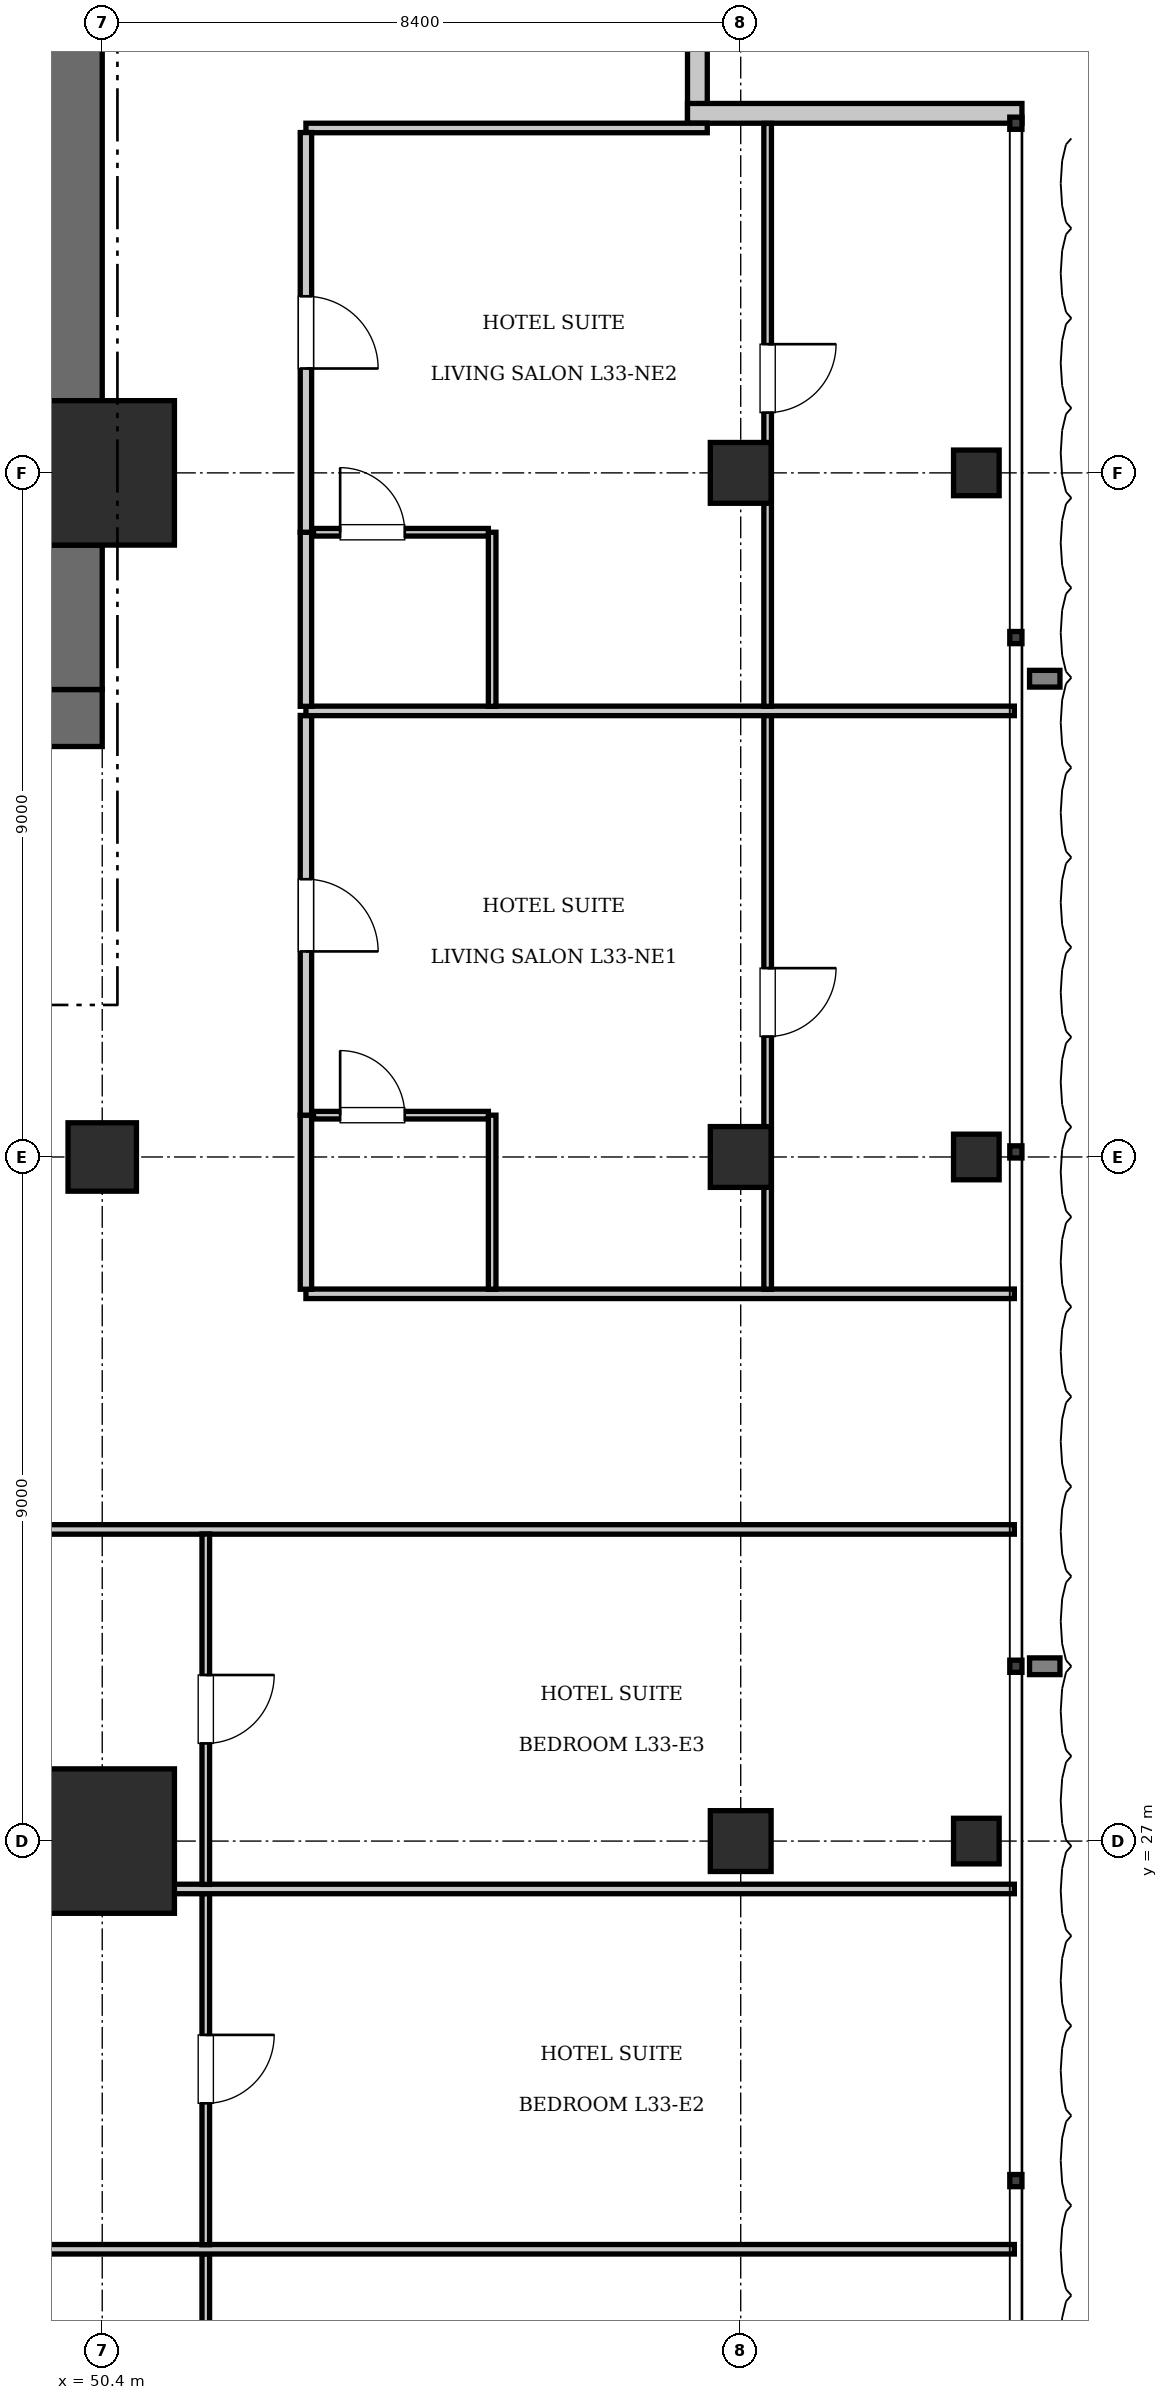
"""IFC4 building model, lengths in metres.
Left out: names, types, materials, properties, quantities, classifications, styles, units other than length and angle.
Written with IfcOpenShell. Run it as: python <this file> out.ifc"""

import sys

from ifc_helpers import new_model, si_unit, direction, frame, frame_2d, origin, origin_2d, place, context, subcontext, project, spatial, rectangle, i_section, extrude, element, fill, save


model = new_model("IFC4")
c1 = context("Model", 3, precision=1e-05, world=origin(), true_north=direction((0.0, 1.0)))
c2 = subcontext(c1, "Body", "Model", "MODEL_VIEW")
j1 = project(units=[si_unit("LENGTHUNIT", "METRE"), si_unit("PLANEANGLEUNIT", "RADIAN")], contexts=[c1])
p1 = place(None, origin())
s1 = spatial("IfcSite", under=j1, at=p1, CompositionType="ELEMENT")
p2 = place(p1, origin())
s2 = spatial("IfcBuilding", under=s1, at=p2, CompositionType="ELEMENT")
p3 = place(p2, frame((0.0, 0.0, 138.95)))
s3 = spatial("IfcBuildingStorey", under=s2, at=p3, CompositionType="ELEMENT", Elevation=138.95)
for number, where, z_axis, x_axis in (
    (1, (50.4, 27.0, 0.0), (0.0, 0.0, 1.0), (1.0, 0.0, 0.0)),
    (2, (50.4, 45.0, 0.0), (0.0, 0.0, 1.0), (1.0, 0.0, 0.0)),
):
    element("IfcColumn", number, at=place(p3, frame(where, z_axis=z_axis, x_axis=x_axis)), inside=s3, PredefinedType="COLUMN", context=c2, shape_type="SweptSolid", body=[
        extrude(rectangle(XDim=1.9, YDim=1.9, at=origin_2d()), origin(), (0.0, 0.0, 1.0), 3.85),
    ])
p4 = place(p3, frame((43.6, 41.775, 0.0), z_axis=(0.0, 0.0, 1.0), x_axis=(1.0, 0.0, 0.0)))
e3 = element("IfcWall", 3, at=p4, inside=s3, PredefinedType="SHEAR", context=c2, shape_type="SweptSolid", body=[
    extrude(rectangle(XDim=6.8, YDim=0.75, at=frame_2d((3.4, 0.0))), origin(), (0.0, 0.0, 1.0), 3.85),
])
p5 = place(p4, frame((3.9, 0.0, 0.0)))
e4 = element("IfcOpeningElement", 4, at=p5, cuts=e3, PredefinedType="OPENING", context=c2, shape_type="SweptSolid", body=[
    extrude(rectangle(XDim=1.15, YDim=2.15, at=frame_2d((0.575, 1.075))), frame((0.0, 0.385, 0.0), z_axis=(0.0, -1.0, 0.0), x_axis=(1.0, 0.0, 0.0)), (0.0, 0.0, 1.0), 0.77),
])
p6 = place(p4, frame((0.55, 0.0, 0.0)))
e5 = element("IfcOpeningElement", 5, at=p6, cuts=e3, PredefinedType="OPENING", context=c2, shape_type="SweptSolid", body=[
    extrude(rectangle(XDim=1.1, YDim=2.2, at=frame_2d((0.55, 1.1))), frame((0.0, 0.385, 0.0), z_axis=(0.0, -1.0, 0.0), x_axis=(1.0, 0.0, 0.0)), (0.0, 0.0, 1.0), 0.77),
])
p7 = place(p3, frame((50.025, 42.15, 0.0), z_axis=(0.0, 0.0, 1.0), x_axis=(0.0, 1.0, 0.0)))
e6 = element("IfcWall", 6, at=p7, inside=s3, PredefinedType="SHEAR", context=c2, shape_type="SweptSolid", body=[
    extrude(rectangle(XDim=1.9, YDim=0.75, at=frame_2d((0.95, 0.0))), origin(), (0.0, 0.0, 1.0), 3.85),
])
p8 = place(p3, frame((50.025, 45.95, 0.0), z_axis=(0.0, 0.0, 1.0), x_axis=(0.0, 1.0, 0.0)))
e7 = element("IfcWall", 7, at=p8, inside=s3, PredefinedType="SHEAR", context=c2, shape_type="SweptSolid", body=[
    extrude(rectangle(XDim=7.3, YDim=0.75, at=frame_2d((3.65, 0.0))), origin(), (0.0, 0.0, 1.0), 3.85),
])
p9 = place(p3, frame((50.4, 36.0, 0.0), z_axis=(0.0, 0.0, 1.0), x_axis=(1.0, 0.0, 0.0)))
e8 = element("IfcColumn", 8, at=p9, inside=s3, PredefinedType="COLUMN", context=c2, shape_type="SweptSolid", body=[
    extrude(rectangle(XDim=0.9, YDim=0.9, at=origin_2d()), origin(), (0.0, 0.0, 1.0), 3.85),
])
for number, where, z_axis, x_axis in (
    (9, (58.8, 27.0, 0.0), (0.0, 0.0, 1.0), (1.0, 0.0, 0.0)),
    (10, (58.8, 36.0, 0.0), (0.0, 0.0, 1.0), (1.0, 0.0, 0.0)),
    (11, (58.8, 45.0, 0.0), (0.0, 0.0, 1.0), (1.0, 0.0, 0.0)),
):
    element("IfcColumn", number, at=place(p3, frame(where, z_axis=z_axis, x_axis=x_axis)), inside=s3, PredefinedType="COLUMN", context=c2, shape_type="SweptSolid", body=[
        extrude(rectangle(XDim=0.8, YDim=0.8, at=origin_2d()), origin(), (0.0, 0.0, 1.0), 3.85),
    ])
for number, where, z_axis, x_axis in (
    (12, (61.9, 27.0, 0.0), (0.0, 0.0, 1.0), (1.0, 0.0, 0.0)),
    (13, (61.9, 36.0, 0.0), (0.0, 0.0, 1.0), (1.0, 0.0, 0.0)),
    (14, (61.9, 45.0, 0.0), (0.0, 0.0, 1.0), (1.0, 0.0, 0.0)),
):
    element("IfcColumn", number, at=place(p3, frame(where, z_axis=z_axis, x_axis=x_axis)), inside=s3, PredefinedType="COLUMN", context=c2, shape_type="SweptSolid", body=[
        extrude(i_section(OverallWidth=0.6, OverallDepth=0.6, WebThickness=0.025, FlangeThickness=0.038, at=origin_2d()), origin(), (0.0, 0.0, 1.0), 3.85),
    ])
for number, where, z_axis, x_axis in (
    (15, (58.23, 54.0, 0.0), (0.0, 0.0, 1.0), (0.0, -1.0, 0.0)),
    (16, (58.1, 49.73, 0.0), (0.0, 0.0, 1.0), (1.0, 0.0, 0.0)),
):
    element("IfcWall", number, at=place(p3, frame(where, z_axis=z_axis, x_axis=x_axis)), inside=s3, PredefinedType="SOLIDWALL", context=c2, shape_type="SweptSolid", body=[
        extrude(rectangle(XDim=4.4, YDim=0.26, at=frame_2d((2.2, 0.0))), origin(), (0.0, 0.0, 1.0), 3.61),
    ])
p10 = place(p3, frame((37.68, 31.1, 0.0), z_axis=(0.0, 0.0, 1.0), x_axis=(1.0, 0.0, 0.0)))
e17 = element("IfcWall", 17, at=p10, inside=s3, PredefinedType="PARTITIONING", context=c2, shape_type="SweptSolid", body=[
    extrude(rectangle(XDim=24.72, YDim=0.125, at=frame_2d((12.36, 0.0))), origin(), (0.0, 0.0, 1.0), 3.61),
])
p11 = place(p3, frame((51.762, 16.96, 0.0), z_axis=(0.0, 0.0, 1.0), x_axis=(0.0, 1.0, 0.0)))
e18 = element("IfcWall", 18, at=p11, inside=s3, PredefinedType="PARTITIONING", context=c2, shape_type="SweptSolid", body=[
    extrude(rectangle(XDim=4.61, YDim=0.1, at=frame_2d((2.305, 0.0))), origin(), (0.0, 0.0, 1.0), 3.61),
])
p12 = place(p11, frame((1.855, 0.0, 0.0)))
e19 = element("IfcOpeningElement", 19, at=p12, cuts=e18, PredefinedType="OPENING", context=c2, shape_type="SweptSolid", body=[
    extrude(rectangle(XDim=0.9, YDim=2.1, at=frame_2d((0.45, 1.05))), frame((0.0, 0.06, 0.0), z_axis=(0.0, -1.0, 0.0), x_axis=(1.0, 0.0, 0.0)), (0.0, 0.0, 1.0), 0.12),
])
p13 = place(p3, frame((37.68, 21.63, 0.0), z_axis=(0.0, 0.0, 1.0), x_axis=(1.0, 0.0, 0.0)))
e20 = element("IfcWall", 20, at=p13, inside=s3, PredefinedType="PARTITIONING", context=c2, shape_type="SweptSolid", body=[
    extrude(rectangle(XDim=24.72, YDim=0.125, at=frame_2d((12.36, 0.0))), origin(), (0.0, 0.0, 1.0), 3.61),
])
p14 = place(p3, frame((51.762, 21.69, 0.0), z_axis=(0.0, 0.0, 1.0), x_axis=(0.0, 1.0, 0.0)))
e21 = element("IfcWall", 21, at=p14, inside=s3, PredefinedType="PARTITIONING", context=c2, shape_type="SweptSolid", body=[
    extrude(rectangle(XDim=4.62, YDim=0.1, at=frame_2d((2.31, 0.0))), origin(), (0.0, 0.0, 1.0), 3.61),
])
p15 = place(p14, frame((1.86, 0.0, 0.0)))
e22 = element("IfcOpeningElement", 22, at=p15, cuts=e21, PredefinedType="OPENING", context=c2, shape_type="SweptSolid", body=[
    extrude(rectangle(XDim=0.9, YDim=2.1, at=frame_2d((0.45, 1.05))), frame((0.0, 0.06, 0.0), z_axis=(0.0, -1.0, 0.0), x_axis=(1.0, 0.0, 0.0)), (0.0, 0.0, 1.0), 0.12),
])
p16 = place(p3, frame((37.68, 26.37, 0.0), z_axis=(0.0, 0.0, 1.0), x_axis=(1.0, 0.0, 0.0)))
e23 = element("IfcWall", 23, at=p16, inside=s3, PredefinedType="PARTITIONING", context=c2, shape_type="SweptSolid", body=[
    extrude(rectangle(XDim=24.72, YDim=0.125, at=frame_2d((12.36, 0.0))), origin(), (0.0, 0.0, 1.0), 3.61),
])
p17 = place(p3, frame((51.762, 26.43, 0.0), z_axis=(0.0, 0.0, 1.0), x_axis=(0.0, 1.0, 0.0)))
e24 = element("IfcWall", 24, at=p17, inside=s3, PredefinedType="PARTITIONING", context=c2, shape_type="SweptSolid", body=[
    extrude(rectangle(XDim=4.61, YDim=0.1, at=frame_2d((2.305, 0.0))), origin(), (0.0, 0.0, 1.0), 3.61),
])
p18 = place(p17, frame((1.855, 0.0, 0.0)))
e25 = element("IfcOpeningElement", 25, at=p18, cuts=e24, PredefinedType="OPENING", context=c2, shape_type="SweptSolid", body=[
    extrude(rectangle(XDim=0.9, YDim=2.1, at=frame_2d((0.45, 1.05))), frame((0.0, 0.06, 0.0), z_axis=(0.0, -1.0, 0.0), x_axis=(1.0, 0.0, 0.0)), (0.0, 0.0, 1.0), 0.12),
])
p19 = place(p3, frame((53.08, 34.2, 0.0), z_axis=(0.0, 0.0, 1.0), x_axis=(1.0, 0.0, 0.0)))
e26 = element("IfcWall", 26, at=p19, inside=s3, PredefinedType="PARTITIONING", context=c2, shape_type="SweptSolid", body=[
    extrude(rectangle(XDim=9.32, YDim=0.125, at=frame_2d((4.66, 0.0))), origin(), (0.0, 0.0, 1.0), 3.61),
])
p20 = place(p3, frame((53.08, 49.538, 0.0), z_axis=(0.0, 0.0, 1.0), x_axis=(1.0, 0.0, 0.0)))
e27 = element("IfcWall", 27, at=p20, inside=s3, PredefinedType="PARTITIONING", context=c2, shape_type="SweptSolid", body=[
    extrude(rectangle(XDim=5.28, YDim=0.125, at=frame_2d((2.64, 0.0))), origin(), (0.0, 0.0, 1.0), 3.61),
])
p21 = place(p3, frame((53.08, 34.26, 0.0), z_axis=(0.0, 0.0, 1.0), x_axis=(0.0, 1.0, 0.0)))
e28 = element("IfcWall", 28, at=p21, inside=s3, PredefinedType="PARTITIONING", context=c2, shape_type="SweptSolid", body=[
    extrude(rectangle(XDim=2.29, YDim=0.15, at=frame_2d((1.145, 0.0))), origin(), (0.0, 0.0, 1.0), 3.61),
])
p22 = place(p3, frame((53.08, 36.55, 0.0), z_axis=(0.0, 0.0, 1.0), x_axis=(0.0, 1.0, 0.0)))
e29 = element("IfcWall", 29, at=p22, inside=s3, PredefinedType="PARTITIONING", context=c2, shape_type="SweptSolid", body=[
    extrude(rectangle(XDim=5.259, YDim=0.15, at=frame_2d((2.629, 0.0))), origin(), (0.0, 0.0, 1.0), 3.61),
])
p23 = place(p22, frame((2.154, 0.0, 0.0)))
e30 = element("IfcOpeningElement", 30, at=p23, cuts=e29, PredefinedType="OPENING", context=c2, shape_type="SweptSolid", body=[
    extrude(rectangle(XDim=0.95, YDim=2.15, at=frame_2d((0.475, 1.075))), frame((0.0, 0.085, 0.0), z_axis=(0.0, -1.0, 0.0), x_axis=(1.0, 0.0, 0.0)), (0.0, 0.0, 1.0), 0.17),
])
p24 = place(p3, frame((55.53, 34.26, 0.0), z_axis=(0.0, 0.0, 1.0), x_axis=(0.0, 1.0, 0.0)))
e31 = element("IfcWall", 31, at=p24, inside=s3, PredefinedType="PARTITIONING", context=c2, shape_type="SweptSolid", body=[
    extrude(rectangle(XDim=2.29, YDim=0.1, at=frame_2d((1.145, 0.0))), origin(), (0.0, 0.0, 1.0), 3.61),
])
p25 = place(p3, frame((53.18, 36.55, 0.0), z_axis=(0.0, 0.0, 1.0), x_axis=(1.0, 0.0, 0.0)))
e32 = element("IfcWall", 32, at=p25, inside=s3, PredefinedType="PARTITIONING", context=c2, shape_type="SweptSolid", body=[
    extrude(rectangle(XDim=2.3, YDim=0.1, at=frame_2d((1.15, 0.0))), origin(), (0.0, 0.0, 1.0), 3.61),
])
p26 = place(p25, frame((0.35, 0.0, 0.0)))
e33 = element("IfcOpeningElement", 33, at=p26, cuts=e32, PredefinedType="OPENING", context=c2, shape_type="SweptSolid", body=[
    extrude(rectangle(XDim=0.85, YDim=2.1, at=frame_2d((0.425, 1.05))), frame((0.0, 0.06, 0.0), z_axis=(0.0, -1.0, 0.0), x_axis=(1.0, 0.0, 0.0)), (0.0, 0.0, 1.0), 0.12),
])
p27 = place(p3, frame((59.154, 34.26, 0.0), z_axis=(0.0, 0.0, 1.0), x_axis=(0.0, 1.0, 0.0)))
e34 = element("IfcWall", 34, at=p27, inside=s3, PredefinedType="PARTITIONING", context=c2, shape_type="SweptSolid", body=[
    extrude(rectangle(XDim=7.549, YDim=0.1, at=frame_2d((3.774, 0.0))), origin(), (0.0, 0.0, 1.0), 3.61),
])
p28 = place(p27, frame((3.324, 0.0, 0.0)))
e35 = element("IfcOpeningElement", 35, at=p28, cuts=e34, PredefinedType="OPENING", context=c2, shape_type="SweptSolid", body=[
    extrude(rectangle(XDim=0.9, YDim=2.1, at=frame_2d((0.45, 1.05))), frame((0.0, 0.06, 0.0), z_axis=(0.0, -1.0, 0.0), x_axis=(1.0, 0.0, 0.0)), (0.0, 0.0, 1.0), 0.12),
])
p29 = place(p3, frame((53.08, 41.869, 0.0), z_axis=(0.0, 0.0, 1.0), x_axis=(1.0, 0.0, 0.0)))
e36 = element("IfcWall", 36, at=p29, inside=s3, PredefinedType="PARTITIONING", context=c2, shape_type="SweptSolid", body=[
    extrude(rectangle(XDim=9.32, YDim=0.125, at=frame_2d((4.66, 0.0))), origin(), (0.0, 0.0, 1.0), 3.61),
])
p30 = place(p3, frame((53.08, 41.929, 0.0), z_axis=(0.0, 0.0, 1.0), x_axis=(0.0, 1.0, 0.0)))
e37 = element("IfcWall", 37, at=p30, inside=s3, PredefinedType="PARTITIONING", context=c2, shape_type="SweptSolid", body=[
    extrude(rectangle(XDim=2.29, YDim=0.15, at=frame_2d((1.145, 0.0))), origin(), (0.0, 0.0, 1.0), 3.61),
])
p31 = place(p3, frame((53.08, 44.219, 0.0), z_axis=(0.0, 0.0, 1.0), x_axis=(0.0, 1.0, 0.0)))
e38 = element("IfcWall", 38, at=p31, inside=s3, PredefinedType="PARTITIONING", context=c2, shape_type="SweptSolid", body=[
    extrude(rectangle(XDim=5.259, YDim=0.15, at=frame_2d((2.629, 0.0))), origin(), (0.0, 0.0, 1.0), 3.61),
])
p32 = place(p31, frame((2.154, 0.0, 0.0)))
e39 = element("IfcOpeningElement", 39, at=p32, cuts=e38, PredefinedType="OPENING", context=c2, shape_type="SweptSolid", body=[
    extrude(rectangle(XDim=0.95, YDim=2.15, at=frame_2d((0.475, 1.075))), frame((0.0, 0.085, 0.0), z_axis=(0.0, -1.0, 0.0), x_axis=(1.0, 0.0, 0.0)), (0.0, 0.0, 1.0), 0.17),
])
p33 = place(p3, frame((55.53, 41.929, 0.0), z_axis=(0.0, 0.0, 1.0), x_axis=(0.0, 1.0, 0.0)))
e40 = element("IfcWall", 40, at=p33, inside=s3, PredefinedType="PARTITIONING", context=c2, shape_type="SweptSolid", body=[
    extrude(rectangle(XDim=2.29, YDim=0.1, at=frame_2d((1.145, 0.0))), origin(), (0.0, 0.0, 1.0), 3.61),
])
p34 = place(p3, frame((53.18, 44.219, 0.0), z_axis=(0.0, 0.0, 1.0), x_axis=(1.0, 0.0, 0.0)))
e41 = element("IfcWall", 41, at=p34, inside=s3, PredefinedType="PARTITIONING", context=c2, shape_type="SweptSolid", body=[
    extrude(rectangle(XDim=2.3, YDim=0.1, at=frame_2d((1.15, 0.0))), origin(), (0.0, 0.0, 1.0), 3.61),
])
p35 = place(p34, frame((0.35, 0.0, 0.0)))
e42 = element("IfcOpeningElement", 42, at=p35, cuts=e41, PredefinedType="OPENING", context=c2, shape_type="SweptSolid", body=[
    extrude(rectangle(XDim=0.85, YDim=2.1, at=frame_2d((0.425, 1.05))), frame((0.0, 0.06, 0.0), z_axis=(0.0, -1.0, 0.0), x_axis=(1.0, 0.0, 0.0)), (0.0, 0.0, 1.0), 0.12),
])
p36 = place(p3, frame((59.154, 41.929, 0.0), z_axis=(0.0, 0.0, 1.0), x_axis=(0.0, 1.0, 0.0)))
e43 = element("IfcWall", 43, at=p36, inside=s3, PredefinedType="PARTITIONING", context=c2, shape_type="SweptSolid", body=[
    extrude(rectangle(XDim=7.669, YDim=0.1, at=frame_2d((3.834, 0.0))), origin(), (0.0, 0.0, 1.0), 3.61),
])
p37 = place(p36, frame((3.864, 0.0, 0.0)))
e44 = element("IfcOpeningElement", 44, at=p37, cuts=e43, PredefinedType="OPENING", context=c2, shape_type="SweptSolid", body=[
    extrude(rectangle(XDim=0.9, YDim=2.1, at=frame_2d((0.45, 1.05))), frame((0.0, 0.06, 0.0), z_axis=(0.0, -1.0, 0.0), x_axis=(1.0, 0.0, 0.0)), (0.0, 0.0, 1.0), 0.12),
])
p38 = place(p15, frame((0.9, 0.0, 0.0), z_axis=(0.0, 0.0, 1.0), x_axis=(-1.0, 0.0, 0.0)))
e45 = element("IfcDoor", 45, at=p38, inside=s3, OperationType="SINGLE_SWING_LEFT", PredefinedType="DOOR", context=c2, shape_type="SweptSolid", body=[
    extrude(rectangle(XDim=0.9, YDim=2.1, at=frame_2d((0.45, 1.05))), frame((0.0, 0.025, 0.0), z_axis=(0.0, -1.0, 0.0), x_axis=(1.0, 0.0, 0.0)), (0.0, 0.0, 1.0), 0.05),
])
fill(e22, e45)
p39 = place(p18, frame((0.9, 0.0, 0.0), z_axis=(0.0, 0.0, 1.0), x_axis=(-1.0, 0.0, 0.0)))
e46 = element("IfcDoor", 46, at=p39, inside=s3, OperationType="SINGLE_SWING_LEFT", PredefinedType="DOOR", context=c2, shape_type="SweptSolid", body=[
    extrude(rectangle(XDim=0.9, YDim=2.1, at=frame_2d((0.45, 1.05))), frame((0.0, 0.025, 0.0), z_axis=(0.0, -1.0, 0.0), x_axis=(1.0, 0.0, 0.0)), (0.0, 0.0, 1.0), 0.05),
])
fill(e25, e46)
p40 = place(p26, origin())
e47 = element("IfcDoor", 47, at=p40, inside=s3, OperationType="SINGLE_SWING_LEFT", PredefinedType="DOOR", context=c2, shape_type="SweptSolid", body=[
    extrude(rectangle(XDim=0.85, YDim=2.1, at=frame_2d((0.425, 1.05))), frame((0.0, 0.025, 0.0), z_axis=(0.0, -1.0, 0.0), x_axis=(1.0, 0.0, 0.0)), (0.0, 0.0, 1.0), 0.05),
])
fill(e33, e47)
p41 = place(p23, frame((0.95, 0.0, 0.0), z_axis=(0.0, 0.0, 1.0), x_axis=(-1.0, 0.0, 0.0)))
e48 = element("IfcDoor", 48, at=p41, inside=s3, OperationType="SINGLE_SWING_RIGHT", PredefinedType="DOOR", context=c2, shape_type="SweptSolid", body=[
    extrude(rectangle(XDim=0.95, YDim=2.15, at=frame_2d((0.475, 1.075))), frame((0.0, 0.025, 0.0), z_axis=(0.0, -1.0, 0.0), x_axis=(1.0, 0.0, 0.0)), (0.0, 0.0, 1.0), 0.05),
])
fill(e30, e48)
p42 = place(p28, frame((0.9, 0.0, 0.0), z_axis=(0.0, 0.0, 1.0), x_axis=(-1.0, 0.0, 0.0)))
e49 = element("IfcDoor", 49, at=p42, inside=s3, OperationType="SINGLE_SWING_LEFT", PredefinedType="DOOR", context=c2, shape_type="SweptSolid", body=[
    extrude(rectangle(XDim=0.9, YDim=2.1, at=frame_2d((0.45, 1.05))), frame((0.0, 0.025, 0.0), z_axis=(0.0, -1.0, 0.0), x_axis=(1.0, 0.0, 0.0)), (0.0, 0.0, 1.0), 0.05),
])
fill(e35, e49)
p43 = place(p35, origin())
e50 = element("IfcDoor", 50, at=p43, inside=s3, OperationType="SINGLE_SWING_LEFT", PredefinedType="DOOR", context=c2, shape_type="SweptSolid", body=[
    extrude(rectangle(XDim=0.85, YDim=2.1, at=frame_2d((0.425, 1.05))), frame((0.0, 0.025, 0.0), z_axis=(0.0, -1.0, 0.0), x_axis=(1.0, 0.0, 0.0)), (0.0, 0.0, 1.0), 0.05),
])
fill(e42, e50)
p44 = place(p32, frame((0.95, 0.0, 0.0), z_axis=(0.0, 0.0, 1.0), x_axis=(-1.0, 0.0, 0.0)))
e51 = element("IfcDoor", 51, at=p44, inside=s3, OperationType="SINGLE_SWING_RIGHT", PredefinedType="DOOR", context=c2, shape_type="SweptSolid", body=[
    extrude(rectangle(XDim=0.95, YDim=2.15, at=frame_2d((0.475, 1.075))), frame((0.0, 0.025, 0.0), z_axis=(0.0, -1.0, 0.0), x_axis=(1.0, 0.0, 0.0)), (0.0, 0.0, 1.0), 0.05),
])
fill(e39, e51)
p45 = place(p37, frame((0.9, 0.0, 0.0), z_axis=(0.0, 0.0, 1.0), x_axis=(-1.0, 0.0, 0.0)))
e52 = element("IfcDoor", 52, at=p45, inside=s3, OperationType="SINGLE_SWING_LEFT", PredefinedType="DOOR", context=c2, shape_type="SweptSolid", body=[
    extrude(rectangle(XDim=0.9, YDim=2.1, at=frame_2d((0.45, 1.05))), frame((0.0, 0.025, 0.0), z_axis=(0.0, -1.0, 0.0), x_axis=(1.0, 0.0, 0.0)), (0.0, 0.0, 1.0), 0.05),
])
fill(e44, e52)
save(model, sys.argv[1])
